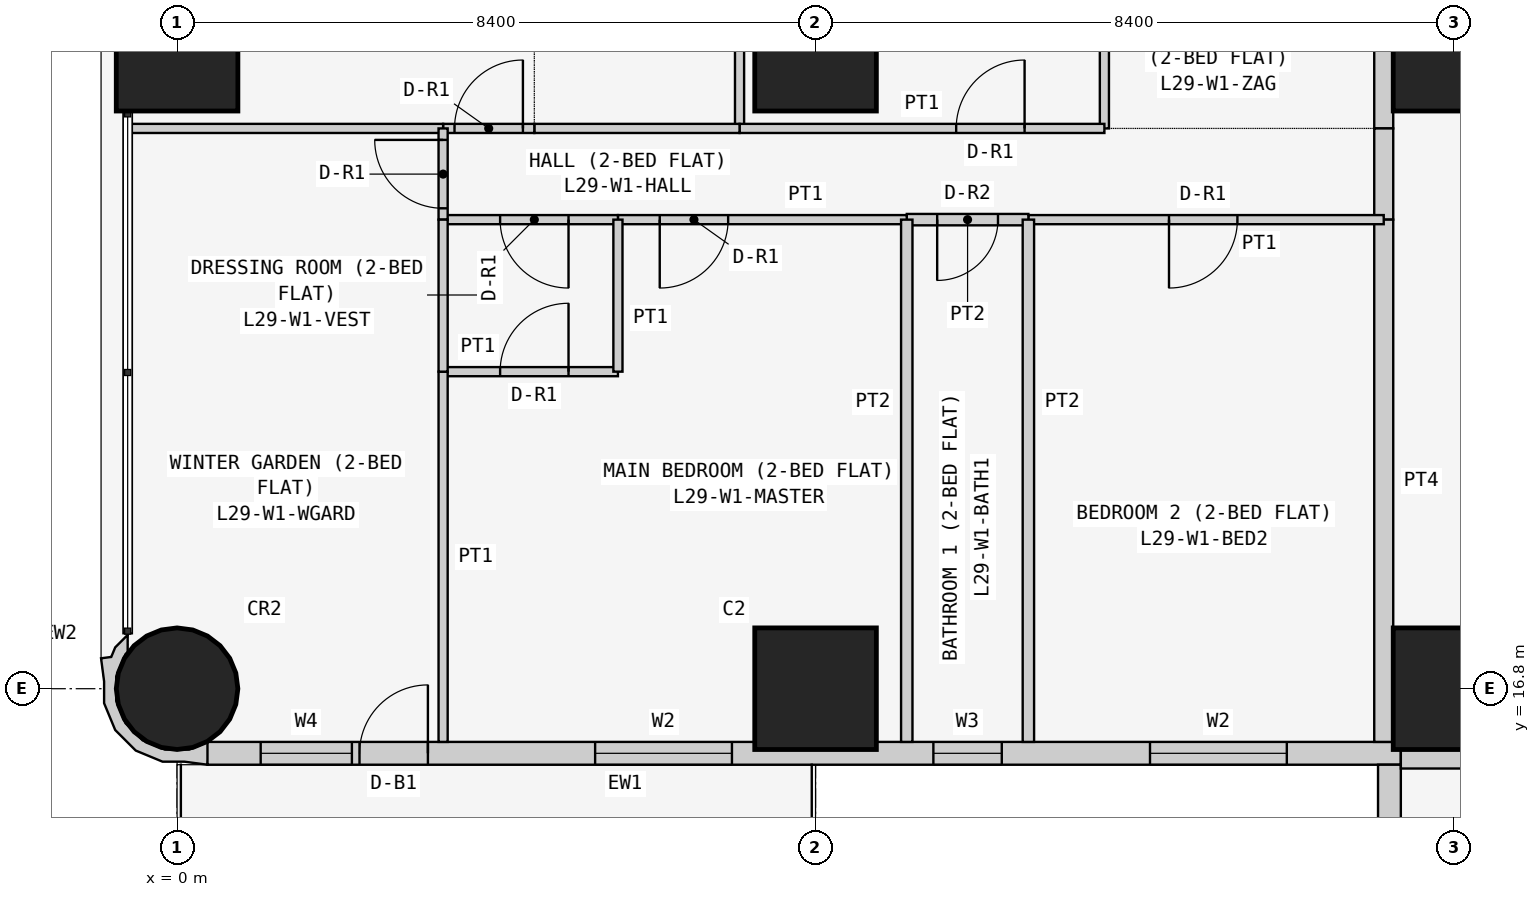
"""IFC4 building model, lengths in metres.
Left out: names, types, materials, properties, quantities, classifications, styles, units other than length and angle.
Written with IfcOpenShell. Run it as: python <this file> out.ifc"""

import sys

from ifc_helpers import new_model, si_unit, direction, frame, frame_2d, origin, origin_2d, place, context, subcontext, project, spatial, polyline, rectangle, circle, outline, extrude, element, fill, save


model = new_model("IFC4")
c1 = context("Model", 3, precision=1e-05, world=origin(), true_north=direction((0.0, 1.0)))
c2 = subcontext(c1, "Body", "Model", "MODEL_VIEW")
j1 = project(units=[si_unit("LENGTHUNIT", "METRE"), si_unit("PLANEANGLEUNIT", "RADIAN")], contexts=[c1])
p1 = place(None, origin())
s1 = spatial("IfcSite", under=j1, at=p1, CompositionType="ELEMENT")
p2 = place(p1, origin())
s2 = spatial("IfcBuilding", under=s1, at=p2, CompositionType="ELEMENT")
p3 = place(p2, frame((0.0, 0.0, 116.1)))
s3 = spatial("IfcBuildingStorey", under=s2, at=p3, CompositionType="ELEMENT", Elevation=116.1)
p4 = place(p3, frame((0.0, 16.8, 0.0), z_axis=(0.0, 0.0, 1.0), x_axis=(1.0, 0.0, 0.0)))
e1 = element("IfcColumn", 1, at=p4, inside=s3, PredefinedType="COLUMN", context=c2, shape_type="SweptSolid", body=[
    extrude(circle(Radius=0.8, at=origin_2d()), origin(), (0.0, 0.0, 1.0), 3.6),
])
for number, where, z_axis, x_axis in (
    (2, (0.0, 25.2, 0.0), (0.0, 0.0, 1.0), (1.0, 0.0, 0.0)),
    (3, (8.4, 16.8, 0.0), (0.0, 0.0, 1.0), (1.0, 0.0, 0.0)),
    (4, (8.4, 25.2, 0.0), (0.0, 0.0, 1.0), (1.0, 0.0, 0.0)),
    (5, (16.8, 16.8, 0.0), (0.0, 0.0, 1.0), (1.0, 0.0, 0.0)),
    (6, (16.8, 25.2, 0.0), (0.0, 0.0, 1.0), (1.0, 0.0, 0.0)),
):
    element("IfcColumn", number, at=place(p3, frame(where, z_axis=z_axis, x_axis=x_axis)), inside=s3, PredefinedType="COLUMN", context=c2, shape_type="SweptSolid", body=[
        extrude(rectangle(XDim=1.6, YDim=1.6, at=origin_2d()), origin(), (0.0, 0.0, 1.0), 3.6),
    ])
p5 = place(p3, frame((0.4, 15.95, 0.0), z_axis=(0.0, 0.0, 1.0), x_axis=(1.0, 0.0, 0.0)))
e7 = element("IfcWall", 7, at=p5, inside=s3, PredefinedType="SOLIDWALL", context=c2, shape_type="SweptSolid", body=[
    extrude(rectangle(XDim=15.7, YDim=0.3, at=frame_2d((7.85, 0.0))), origin(), (0.0, 0.0, 1.0), 3.45),
])
p6 = place(p5, frame((12.4, 0.0, 0.9)))
e8 = element("IfcOpeningElement", 8, at=p6, cuts=e7, PredefinedType="OPENING", context=c2, shape_type="SweptSolid", body=[
    extrude(rectangle(XDim=1.8, YDim=1.5, at=frame_2d((0.9, 0.75))), frame((0.0, 0.16, 0.0), z_axis=(0.0, -1.0, 0.0), x_axis=(1.0, 0.0, 0.0)), (0.0, 0.0, 1.0), 0.32),
])
p7 = place(p5, frame((9.55, 0.0, 1.5)))
e9 = element("IfcOpeningElement", 9, at=p7, cuts=e7, PredefinedType="OPENING", context=c2, shape_type="SweptSolid", body=[
    extrude(rectangle(XDim=0.9, YDim=0.7, at=frame_2d((0.45, 0.35))), frame((0.0, 0.16, 0.0), z_axis=(0.0, -1.0, 0.0), x_axis=(1.0, 0.0, 0.0)), (0.0, 0.0, 1.0), 0.32),
])
p8 = place(p5, frame((5.1, 0.0, 0.9)))
e10 = element("IfcOpeningElement", 10, at=p8, cuts=e7, PredefinedType="OPENING", context=c2, shape_type="SweptSolid", body=[
    extrude(rectangle(XDim=1.8, YDim=1.5, at=frame_2d((0.9, 0.75))), frame((0.0, 0.16, 0.0), z_axis=(0.0, -1.0, 0.0), x_axis=(1.0, 0.0, 0.0)), (0.0, 0.0, 1.0), 0.32),
])
p9 = place(p5, frame((2.0, 0.0, 0.0)))
e11 = element("IfcOpeningElement", 11, at=p9, cuts=e7, PredefinedType="OPENING", context=c2, shape_type="SweptSolid", body=[
    extrude(rectangle(XDim=0.9, YDim=2.4, at=frame_2d((0.45, 1.2))), frame((0.0, 0.16, 0.0), z_axis=(0.0, -1.0, 0.0), x_axis=(1.0, 0.0, 0.0)), (0.0, 0.0, 1.0), 0.32),
])
p10 = place(p5, frame((0.7, 0.0, 0.9)))
e12 = element("IfcOpeningElement", 12, at=p10, cuts=e7, PredefinedType="OPENING", context=c2, shape_type="SweptSolid", body=[
    extrude(rectangle(XDim=1.2, YDim=1.5, at=frame_2d((0.6, 0.75))), frame((0.0, 0.16, 0.0), z_axis=(0.0, -1.0, 0.0), x_axis=(1.0, 0.0, 0.0)), (0.0, 0.0, 1.0), 0.32),
])
p11 = place(p3, frame((15.95, 15.8, 0.0), z_axis=(0.0, 0.0, 1.0), x_axis=(0.0, -1.0, 0.0)))
e13 = element("IfcWall", 13, at=p11, inside=s3, PredefinedType="SOLIDWALL", context=c2, shape_type="SweptSolid", body=[
    extrude(rectangle(XDim=7.0, YDim=0.3, at=frame_2d((3.5, 0.0))), origin(), (0.0, 0.0, 1.0), 3.45),
])
p12 = place(p11, frame((1.5, 0.0, 0.9)))
e14 = element("IfcOpeningElement", 14, at=p12, cuts=e13, PredefinedType="OPENING", context=c2, shape_type="SweptSolid", body=[
    extrude(rectangle(XDim=2.4, YDim=1.5, at=frame_2d((1.2, 0.75))), frame((0.0, 0.16, 0.0), z_axis=(0.0, -1.0, 0.0), x_axis=(1.0, 0.0, 0.0)), (0.0, 0.0, 1.0), 0.32),
])
p13 = place(p11, frame((5.05, 0.0, 0.9)))
e15 = element("IfcOpeningElement", 15, at=p13, cuts=e13, PredefinedType="OPENING", context=c2, shape_type="SweptSolid", body=[
    extrude(rectangle(XDim=1.2, YDim=1.5, at=frame_2d((0.6, 0.75))), frame((0.0, 0.16, 0.0), z_axis=(0.0, -1.0, 0.0), x_axis=(1.0, 0.0, 0.0)), (0.0, 0.0, 1.0), 0.32),
])
p14 = place(p3, frame((-0.595, 17.448, 0.0), z_axis=(0.0, 0.0, 1.0), x_axis=(-0.93923434088, -0.343276641956, 0.0)))
e16 = element("IfcWall", 16, at=p14, inside=s3, PredefinedType="SOLIDWALL", context=c2, shape_type="SweptSolid", body=[
    extrude(outline(polyline([(-0.369, 1.89), (-0.509, 1.621), (-0.491, 1.614), (-0.479, 1.609), (-0.211, 1.62), (0.088, 1.511), (0.323, 1.295), (0.457, 1.006), (0.47, 0.688), (0.361, 0.389), (0.146, 0.154), (0.108, 0.137), (0.031, -0.075), (0.241, 0.023), (0.334, 0.124), (0.465, 0.094), (0.532, 0.393), (0.631, 0.663), (0.614, 1.045), (0.453, 1.391), (0.172, 1.649), (-0.098, 1.748), (-0.369, 1.89)])), origin(), (0.0, 0.0, 1.0), 3.45),
])
p15 = place(p3, frame((22.971, 15.875, 0.0), z_axis=(0.0, 0.0, 1.0), x_axis=(-1.0, 0.0, 0.0)))
e17 = element("IfcWall", 17, at=p15, inside=s3, PredefinedType="PARTITIONING", context=c2, shape_type="SweptSolid", body=[
    extrude(rectangle(XDim=6.871, YDim=0.25, at=frame_2d((3.436, 0.0))), origin(), (0.0, 0.0, 1.0), 3.45),
])
p16 = place(p3, frame((15.875, 24.171, 0.0), z_axis=(0.0, 0.0, 1.0), x_axis=(0.0, 1.0, 0.0)))
e18 = element("IfcWall", 18, at=p16, inside=s3, PredefinedType="PARTITIONING", context=c2, shape_type="SweptSolid", body=[
    extrude(rectangle(XDim=5.229, YDim=0.25, at=frame_2d((2.615, 0.0))), origin(), (0.0, 0.0, 1.0), 3.45),
])
p17 = place(p16, frame((2.129, 0.0, 0.0)))
e19 = element("IfcOpeningElement", 19, at=p17, cuts=e18, PredefinedType="OPENING", context=c2, shape_type="SweptSolid", body=[
    extrude(rectangle(XDim=1.0, YDim=2.1, at=frame_2d((0.5, 1.05))), frame((0.0, 0.135, 0.0), z_axis=(0.0, -1.0, 0.0), x_axis=(1.0, 0.0, 0.0)), (0.0, 0.0, 1.0), 0.27),
])
p18 = place(p3, frame((15.875, 22.971, 0.0), z_axis=(0.0, 0.0, 1.0), x_axis=(0.0, 1.0, 0.0)))
e20 = element("IfcWall", 20, at=p18, inside=s3, PredefinedType="PARTITIONING", context=c2, shape_type="SweptSolid", body=[
    extrude(rectangle(XDim=1.2, YDim=0.25, at=frame_2d((0.6, 0.0))), origin(), (0.0, 0.0, 1.0), 3.45),
])
p19 = place(p3, frame((15.875, 16.1, 0.0), z_axis=(0.0, 0.0, 1.0), x_axis=(0.0, 1.0, 0.0)))
e21 = element("IfcWall", 21, at=p19, inside=s3, PredefinedType="PARTITIONING", context=c2, shape_type="SweptSolid", body=[
    extrude(rectangle(XDim=6.871, YDim=0.25, at=frame_2d((3.436, 0.0))), origin(), (0.0, 0.0, 1.0), 3.45),
])
for number, where, z_axis, x_axis in (
    (22, (12.2, 29.4, 0.0), (0.0, 0.0, 1.0), (0.0, -1.0, 0.0)),
    (23, (7.4, 29.4, 0.0), (0.0, 0.0, 1.0), (0.0, -1.0, 0.0)),
):
    element("IfcWall", number, at=place(p3, frame(where, z_axis=z_axis, x_axis=x_axis)), inside=s3, PredefinedType="PARTITIONING", context=c2, shape_type="SweptSolid", body=[
        extrude(rectangle(XDim=5.229, YDim=0.12, at=frame_2d((2.615, 0.0))), origin(), (0.0, 0.0, 1.0), 3.45),
    ])
p20 = place(p3, frame((7.4, 24.171, 0.0), z_axis=(0.0, 0.0, 1.0), x_axis=(1.0, 0.0, 0.0)))
e24 = element("IfcWall", 24, at=p20, inside=s3, PredefinedType="PARTITIONING", context=c2, shape_type="SweptSolid", body=[
    extrude(rectangle(XDim=4.8, YDim=0.12, at=frame_2d((2.4, 0.0))), origin(), (0.0, 0.0, 1.0), 3.45),
])
p21 = place(p20, frame((2.85, 0.0, 0.0)))
e25 = element("IfcOpeningElement", 25, at=p21, cuts=e24, PredefinedType="OPENING", context=c2, shape_type="SweptSolid", body=[
    extrude(rectangle(XDim=0.9, YDim=2.1, at=frame_2d((0.45, 1.05))), frame((0.0, 0.07, 0.0), z_axis=(0.0, -1.0, 0.0), x_axis=(1.0, 0.0, 0.0)), (0.0, 0.0, 1.0), 0.14),
])
p22 = place(p3, frame((4.7, 24.171, 0.0), z_axis=(0.0, 0.0, 1.0), x_axis=(1.0, 0.0, 0.0)))
e26 = element("IfcWall", 26, at=p22, inside=s3, PredefinedType="PARTITIONING", context=c2, shape_type="SweptSolid", body=[
    extrude(rectangle(XDim=2.7, YDim=0.12, at=frame_2d((1.35, 0.0))), origin(), (0.0, 0.0, 1.0), 3.45),
])
p23 = place(p3, frame((3.5, 24.171, 0.0), z_axis=(0.0, 0.0, 1.0), x_axis=(1.0, 0.0, 0.0)))
e27 = element("IfcWall", 27, at=p23, inside=s3, PredefinedType="PARTITIONING", context=c2, shape_type="SweptSolid", body=[
    extrude(rectangle(XDim=1.2, YDim=0.12, at=frame_2d((0.6, 0.0))), origin(), (0.0, 0.0, 1.0), 3.45),
])
p24 = place(p23, frame((0.15, 0.0, 0.0)))
e28 = element("IfcOpeningElement", 28, at=p24, cuts=e27, PredefinedType="OPENING", context=c2, shape_type="SweptSolid", body=[
    extrude(rectangle(XDim=0.9, YDim=2.1, at=frame_2d((0.45, 1.05))), frame((0.0, 0.07, 0.0), z_axis=(0.0, -1.0, 0.0), x_axis=(1.0, 0.0, 0.0)), (0.0, 0.0, 1.0), 0.14),
])
p25 = place(p3, frame((-0.65, 24.171, 0.0), z_axis=(0.0, 0.0, 1.0), x_axis=(1.0, 0.0, 0.0)))
e29 = element("IfcWall", 29, at=p25, inside=s3, PredefinedType="PARTITIONING", context=c2, shape_type="SweptSolid", body=[
    extrude(rectangle(XDim=4.15, YDim=0.12, at=frame_2d((2.075, 0.0))), origin(), (0.0, 0.0, 1.0), 3.45),
])
p26 = place(p3, frame((11.2, 22.971, 0.0), z_axis=(0.0, 0.0, 1.0), x_axis=(1.0, 0.0, 0.0)))
e30 = element("IfcWall", 30, at=p26, inside=s3, PredefinedType="PARTITIONING", context=c2, shape_type="SweptSolid", body=[
    extrude(rectangle(XDim=4.675, YDim=0.12, at=frame_2d((2.337, 0.0))), origin(), (0.0, 0.0, 1.0), 3.45),
])
p27 = place(p26, frame((1.85, 0.0, 0.0)))
e31 = element("IfcOpeningElement", 31, at=p27, cuts=e30, PredefinedType="OPENING", context=c2, shape_type="SweptSolid", body=[
    extrude(rectangle(XDim=0.9, YDim=2.1, at=frame_2d((0.45, 1.05))), frame((0.0, 0.07, 0.0), z_axis=(0.0, -1.0, 0.0), x_axis=(1.0, 0.0, 0.0)), (0.0, 0.0, 1.0), 0.14),
])
p28 = place(p3, frame((9.6, 22.971, 0.0), z_axis=(0.0, 0.0, 1.0), x_axis=(1.0, 0.0, 0.0)))
e32 = element("IfcWall", 32, at=p28, inside=s3, PredefinedType="PARTITIONING", context=c2, shape_type="SweptSolid", body=[
    extrude(rectangle(XDim=1.6, YDim=0.15, at=frame_2d((0.8, 0.0))), origin(), (0.0, 0.0, 1.0), 3.45),
])
p29 = place(p28, frame((0.4, 0.0, 0.0)))
e33 = element("IfcOpeningElement", 33, at=p29, cuts=e32, PredefinedType="OPENING", context=c2, shape_type="SweptSolid", body=[
    extrude(rectangle(XDim=0.8, YDim=2.1, at=frame_2d((0.4, 1.05))), frame((0.0, 0.085, 0.0), z_axis=(0.0, -1.0, 0.0), x_axis=(1.0, 0.0, 0.0)), (0.0, 0.0, 1.0), 0.17),
])
p30 = place(p3, frame((5.8, 22.971, 0.0), z_axis=(0.0, 0.0, 1.0), x_axis=(1.0, 0.0, 0.0)))
e34 = element("IfcWall", 34, at=p30, inside=s3, PredefinedType="PARTITIONING", context=c2, shape_type="SweptSolid", body=[
    extrude(rectangle(XDim=3.8, YDim=0.12, at=frame_2d((1.9, 0.0))), origin(), (0.0, 0.0, 1.0), 3.45),
])
p31 = place(p30, frame((0.55, 0.0, 0.0)))
e35 = element("IfcOpeningElement", 35, at=p31, cuts=e34, PredefinedType="OPENING", context=c2, shape_type="SweptSolid", body=[
    extrude(rectangle(XDim=0.9, YDim=2.1, at=frame_2d((0.45, 1.05))), frame((0.0, 0.07, 0.0), z_axis=(0.0, -1.0, 0.0), x_axis=(1.0, 0.0, 0.0)), (0.0, 0.0, 1.0), 0.14),
])
p32 = place(p3, frame((3.5, 22.971, 0.0), z_axis=(0.0, 0.0, 1.0), x_axis=(1.0, 0.0, 0.0)))
e36 = element("IfcWall", 36, at=p32, inside=s3, PredefinedType="PARTITIONING", context=c2, shape_type="SweptSolid", body=[
    extrude(rectangle(XDim=2.3, YDim=0.12, at=frame_2d((1.15, 0.0))), origin(), (0.0, 0.0, 1.0), 3.45),
])
p33 = place(p32, frame((0.75, 0.0, 0.0)))
e37 = element("IfcOpeningElement", 37, at=p33, cuts=e36, PredefinedType="OPENING", context=c2, shape_type="SweptSolid", body=[
    extrude(rectangle(XDim=0.9, YDim=2.1, at=frame_2d((0.45, 1.05))), frame((0.0, 0.07, 0.0), z_axis=(0.0, -1.0, 0.0), x_axis=(1.0, 0.0, 0.0)), (0.0, 0.0, 1.0), 0.14),
])
p34 = place(p3, frame((3.5, 24.171, 0.0), z_axis=(0.0, 0.0, 1.0), x_axis=(0.0, -1.0, 0.0)))
e38 = element("IfcWall", 38, at=p34, inside=s3, PredefinedType="PARTITIONING", context=c2, shape_type="SweptSolid", body=[
    extrude(rectangle(XDim=1.2, YDim=0.12, at=frame_2d((0.6, 0.0))), origin(), (0.0, 0.0, 1.0), 3.45),
])
p35 = place(p34, frame((0.151, 0.0, 0.0)))
e39 = element("IfcOpeningElement", 39, at=p35, cuts=e38, PredefinedType="OPENING", context=c2, shape_type="SweptSolid", body=[
    extrude(rectangle(XDim=0.9, YDim=2.1, at=frame_2d((0.45, 1.05))), frame((0.0, 0.07, 0.0), z_axis=(0.0, -1.0, 0.0), x_axis=(1.0, 0.0, 0.0)), (0.0, 0.0, 1.0), 0.14),
])
for number, where, z_axis, x_axis in (
    (40, (11.2, 22.971, 0.0), (0.0, 0.0, 1.0), (0.0, -1.0, 0.0)),
    (41, (9.6, 22.971, 0.0), (0.0, 0.0, 1.0), (0.0, -1.0, 0.0)),
):
    element("IfcWall", number, at=place(p3, frame(where, z_axis=z_axis, x_axis=x_axis)), inside=s3, PredefinedType="PARTITIONING", context=c2, shape_type="SweptSolid", body=[
        extrude(rectangle(XDim=6.871, YDim=0.15, at=frame_2d((3.436, 0.0))), origin(), (0.0, 0.0, 1.0), 3.45),
    ])
p36 = place(p3, frame((3.5, 20.971, 0.0), z_axis=(0.0, 0.0, 1.0), x_axis=(1.0, 0.0, 0.0)))
e42 = element("IfcWall", 42, at=p36, inside=s3, PredefinedType="PARTITIONING", context=c2, shape_type="SweptSolid", body=[
    extrude(rectangle(XDim=2.3, YDim=0.12, at=frame_2d((1.15, 0.0))), origin(), (0.0, 0.0, 1.0), 3.45),
])
p37 = place(p36, frame((0.75, 0.0, 0.0)))
e43 = element("IfcOpeningElement", 43, at=p37, cuts=e42, PredefinedType="OPENING", context=c2, shape_type="SweptSolid", body=[
    extrude(rectangle(XDim=0.9, YDim=2.1, at=frame_2d((0.45, 1.05))), frame((0.0, 0.07, 0.0), z_axis=(0.0, -1.0, 0.0), x_axis=(1.0, 0.0, 0.0)), (0.0, 0.0, 1.0), 0.14),
])
p38 = place(p3, frame((5.8, 20.971, 0.0), z_axis=(0.0, 0.0, 1.0), x_axis=(0.0, 1.0, 0.0)))
e44 = element("IfcWall", 44, at=p38, inside=s3, PredefinedType="PARTITIONING", context=c2, shape_type="SweptSolid", body=[
    extrude(rectangle(XDim=2.0, YDim=0.12, at=frame_2d((1.0, 0.0))), origin(), (0.0, 0.0, 1.0), 3.45),
])
p39 = place(p3, frame((3.5, 16.1, 0.0), z_axis=(0.0, 0.0, 1.0), x_axis=(0.0, 1.0, 0.0)))
e45 = element("IfcWall", 45, at=p39, inside=s3, PredefinedType="PARTITIONING", context=c2, shape_type="SweptSolid", body=[
    extrude(rectangle(XDim=4.871, YDim=0.12, at=frame_2d((2.436, 0.0))), origin(), (0.0, 0.0, 1.0), 3.45),
])
p40 = place(p3, frame((3.5, 22.971, 0.0), z_axis=(0.0, 0.0, 1.0), x_axis=(0.0, -1.0, 0.0)))
e46 = element("IfcWall", 46, at=p40, inside=s3, PredefinedType="PARTITIONING", context=c2, shape_type="SweptSolid", body=[
    extrude(rectangle(XDim=2.0, YDim=0.12, at=frame_2d((1.0, 0.0))), origin(), (0.0, 0.0, 1.0), 3.45),
])
p41 = place(p6, origin())
e47 = element("IfcWindow", 47, at=p41, inside=s3, PartitioningType="SINGLE_PANEL", PredefinedType="WINDOW", context=c2, shape_type="SweptSolid", body=[
    extrude(rectangle(XDim=1.8, YDim=1.5, at=frame_2d((0.9, 0.75))), frame((0.0, 0.03, 0.0), z_axis=(0.0, -1.0, 0.0), x_axis=(1.0, 0.0, 0.0)), (0.0, 0.0, 1.0), 0.06),
])
fill(e8, e47)
p42 = place(p7, origin())
e48 = element("IfcWindow", 48, at=p42, inside=s3, PartitioningType="SINGLE_PANEL", PredefinedType="WINDOW", context=c2, shape_type="SweptSolid", body=[
    extrude(rectangle(XDim=0.9, YDim=0.7, at=frame_2d((0.45, 0.35))), frame((0.0, 0.03, 0.0), z_axis=(0.0, -1.0, 0.0), x_axis=(1.0, 0.0, 0.0)), (0.0, 0.0, 1.0), 0.06),
])
fill(e9, e48)
p43 = place(p8, origin())
e49 = element("IfcWindow", 49, at=p43, inside=s3, PartitioningType="SINGLE_PANEL", PredefinedType="WINDOW", context=c2, shape_type="SweptSolid", body=[
    extrude(rectangle(XDim=1.8, YDim=1.5, at=frame_2d((0.9, 0.75))), frame((0.0, 0.03, 0.0), z_axis=(0.0, -1.0, 0.0), x_axis=(1.0, 0.0, 0.0)), (0.0, 0.0, 1.0), 0.06),
])
fill(e10, e49)
p44 = place(p9, origin())
e50 = element("IfcDoor", 50, at=p44, inside=s3, OperationType="SINGLE_SWING_RIGHT", PredefinedType="DOOR", context=c2, shape_type="SweptSolid", body=[
    extrude(rectangle(XDim=0.9, YDim=2.4, at=frame_2d((0.45, 1.2))), frame((0.0, 0.025, 0.0), z_axis=(0.0, -1.0, 0.0), x_axis=(1.0, 0.0, 0.0)), (0.0, 0.0, 1.0), 0.05),
])
fill(e11, e50)
p45 = place(p10, origin())
e51 = element("IfcWindow", 51, at=p45, inside=s3, PartitioningType="SINGLE_PANEL", PredefinedType="WINDOW", context=c2, shape_type="SweptSolid", body=[
    extrude(rectangle(XDim=1.2, YDim=1.5, at=frame_2d((0.6, 0.75))), frame((0.0, 0.03, 0.0), z_axis=(0.0, -1.0, 0.0), x_axis=(1.0, 0.0, 0.0)), (0.0, 0.0, 1.0), 0.06),
])
fill(e12, e51)
p46 = place(p21, origin())
e52 = element("IfcDoor", 52, at=p46, inside=s3, OperationType="SINGLE_SWING_RIGHT", PredefinedType="DOOR", context=c2, shape_type="SweptSolid", body=[
    extrude(rectangle(XDim=0.9, YDim=2.1, at=frame_2d((0.45, 1.05))), frame((0.0, 0.025, 0.0), z_axis=(0.0, -1.0, 0.0), x_axis=(1.0, 0.0, 0.0)), (0.0, 0.0, 1.0), 0.05),
])
fill(e25, e52)
p47 = place(p24, origin())
e53 = element("IfcDoor", 53, at=p47, inside=s3, OperationType="SINGLE_SWING_RIGHT", PredefinedType="DOOR", context=c2, shape_type="SweptSolid", body=[
    extrude(rectangle(XDim=0.9, YDim=2.1, at=frame_2d((0.45, 1.05))), frame((0.0, 0.025, 0.0), z_axis=(0.0, -1.0, 0.0), x_axis=(1.0, 0.0, 0.0)), (0.0, 0.0, 1.0), 0.05),
])
fill(e28, e53)
p48 = place(p27, frame((0.9, 0.0, 0.0), z_axis=(0.0, 0.0, 1.0), x_axis=(-1.0, 0.0, 0.0)))
e54 = element("IfcDoor", 54, at=p48, inside=s3, OperationType="SINGLE_SWING_RIGHT", PredefinedType="DOOR", context=c2, shape_type="SweptSolid", body=[
    extrude(rectangle(XDim=0.9, YDim=2.1, at=frame_2d((0.45, 1.05))), frame((0.0, 0.025, 0.0), z_axis=(0.0, -1.0, 0.0), x_axis=(1.0, 0.0, 0.0)), (0.0, 0.0, 1.0), 0.05),
])
fill(e31, e54)
p49 = place(p29, frame((0.8, 0.0, 0.0), z_axis=(0.0, 0.0, 1.0), x_axis=(-1.0, 0.0, 0.0)))
e55 = element("IfcDoor", 55, at=p49, inside=s3, OperationType="SINGLE_SWING_RIGHT", PredefinedType="DOOR", context=c2, shape_type="SweptSolid", body=[
    extrude(rectangle(XDim=0.8, YDim=2.1, at=frame_2d((0.4, 1.05))), frame((0.0, 0.025, 0.0), z_axis=(0.0, -1.0, 0.0), x_axis=(1.0, 0.0, 0.0)), (0.0, 0.0, 1.0), 0.05),
])
fill(e33, e55)
p50 = place(p31, frame((0.9, 0.0, 0.0), z_axis=(0.0, 0.0, 1.0), x_axis=(-1.0, 0.0, 0.0)))
e56 = element("IfcDoor", 56, at=p50, inside=s3, OperationType="SINGLE_SWING_RIGHT", PredefinedType="DOOR", context=c2, shape_type="SweptSolid", body=[
    extrude(rectangle(XDim=0.9, YDim=2.1, at=frame_2d((0.45, 1.05))), frame((0.0, 0.025, 0.0), z_axis=(0.0, -1.0, 0.0), x_axis=(1.0, 0.0, 0.0)), (0.0, 0.0, 1.0), 0.05),
])
fill(e35, e56)
p51 = place(p33, frame((0.9, 0.0, 0.0), z_axis=(0.0, 0.0, 1.0), x_axis=(-1.0, 0.0, 0.0)))
e57 = element("IfcDoor", 57, at=p51, inside=s3, OperationType="SINGLE_SWING_LEFT", PredefinedType="DOOR", context=c2, shape_type="SweptSolid", body=[
    extrude(rectangle(XDim=0.9, YDim=2.1, at=frame_2d((0.45, 1.05))), frame((0.0, 0.025, 0.0), z_axis=(0.0, -1.0, 0.0), x_axis=(1.0, 0.0, 0.0)), (0.0, 0.0, 1.0), 0.05),
])
fill(e37, e57)
p52 = place(p37, origin())
e58 = element("IfcDoor", 58, at=p52, inside=s3, OperationType="SINGLE_SWING_RIGHT", PredefinedType="DOOR", context=c2, shape_type="SweptSolid", body=[
    extrude(rectangle(XDim=0.9, YDim=2.1, at=frame_2d((0.45, 1.05))), frame((0.0, 0.025, 0.0), z_axis=(0.0, -1.0, 0.0), x_axis=(1.0, 0.0, 0.0)), (0.0, 0.0, 1.0), 0.05),
])
fill(e43, e58)
p53 = place(p35, frame((0.9, 0.0, 0.0), z_axis=(0.0, 0.0, 1.0), x_axis=(-1.0, 0.0, 0.0)))
e59 = element("IfcDoor", 59, at=p53, inside=s3, OperationType="SINGLE_SWING_RIGHT", PredefinedType="DOOR", context=c2, shape_type="SweptSolid", body=[
    extrude(rectangle(XDim=0.9, YDim=2.1, at=frame_2d((0.45, 1.05))), frame((0.0, 0.025, 0.0), z_axis=(0.0, -1.0, 0.0), x_axis=(1.0, 0.0, 0.0)), (0.0, 0.0, 1.0), 0.05),
])
fill(e39, e59)
save(model, sys.argv[1])
